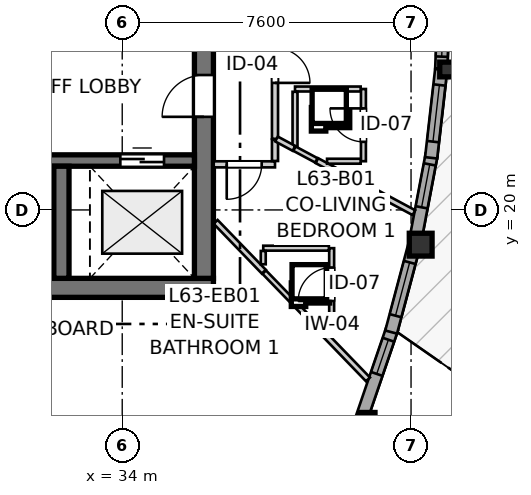
"""IFC4 building model, lengths in metres.
Left out: names, types, materials, properties, quantities, classifications, styles, units other than length and angle.
Written with IfcOpenShell. Run it as: python <this file> out.ifc"""

import sys

from ifc_helpers import new_model, si_unit, direction, frame, frame_2d, origin, origin_2d, place, context, subcontext, project, spatial, rectangle, i_section, extrude, source, transform, mapped, element, fill, save


model = new_model("IFC4")
c1 = context("Model", 3, precision=1e-05, world=origin(), true_north=direction((0.0, 1.0)))
c2 = subcontext(c1, "Body", "Model", "MODEL_VIEW")
j1 = project(units=[si_unit("LENGTHUNIT", "METRE"), si_unit("PLANEANGLEUNIT", "RADIAN")], contexts=[c1])
p1 = place(None, origin())
s1 = spatial("IfcSite", under=j1, at=p1, CompositionType="ELEMENT")
p2 = place(p1, origin())
s2 = spatial("IfcBuilding", under=s1, at=p2, CompositionType="ELEMENT")
p3 = place(p2, frame((0.0, 0.0, 211.6)))
s3 = spatial("IfcBuildingStorey", under=s2, at=p3, CompositionType="ELEMENT", Elevation=211.6)
p4 = place(p3, frame((24.3, 17.95, 0.0), z_axis=(0.0, 0.0, 1.0), x_axis=(1.0, 0.0, 0.0)))
e1 = element("IfcWall", 1, at=p4, inside=s3, PredefinedType="SHEAR", context=c2, shape_type="SweptSolid", body=[
    extrude(rectangle(XDim=12.1, YDim=0.5, at=frame_2d((6.05, 0.0))), origin(), (0.0, 0.0, 1.0), 2.96),
])
p5 = place(p3, frame((36.15, 18.2, 0.0), z_axis=(0.0, 0.0, 1.0), x_axis=(0.0, 1.0, 0.0)))
e2 = element("IfcWall", 2, at=p5, inside=s3, PredefinedType="SHEAR", context=c2, shape_type="SweptSolid", body=[
    extrude(rectangle(XDim=15.6, YDim=0.5, at=frame_2d((7.8, 0.0))), origin(), (0.0, 0.0, 1.0), 2.96),
])
p6 = place(p5, frame((4.25, 0.0, 0.0)))
e3 = element("IfcOpeningElement", 3, at=p6, cuts=e2, PredefinedType="OPENING", context=c2, shape_type="SweptSolid", body=[
    extrude(rectangle(XDim=1.1, YDim=2.15, at=frame_2d((0.55, 1.075))), frame((0.0, 0.26, 0.0), z_axis=(0.0, -1.0, 0.0), x_axis=(1.0, 0.0, 0.0)), (0.0, 0.0, 1.0), 0.52),
])
p7 = place(p5, frame((10.25, 0.0, 0.0)))
e4 = element("IfcOpeningElement", 4, at=p7, cuts=e2, PredefinedType="OPENING", context=c2, shape_type="SweptSolid", body=[
    extrude(rectangle(XDim=1.1, YDim=2.15, at=frame_2d((0.55, 1.075))), frame((0.0, 0.26, 0.0), z_axis=(0.0, -1.0, 0.0), x_axis=(1.0, 0.0, 0.0)), (0.0, 0.0, 1.0), 0.52),
])
p8 = place(p3, frame((24.8, 21.3, 0.0), z_axis=(0.0, 0.0, 1.0), x_axis=(1.0, 0.0, 0.0)))
e5 = element("IfcWall", 5, at=p8, inside=s3, PredefinedType="SHEAR", context=c2, shape_type="SweptSolid", body=[
    extrude(rectangle(XDim=11.1, YDim=0.3, at=frame_2d((5.55, 0.0))), origin(), (0.0, 0.0, 1.0), 2.96),
])
p9 = place(p8, frame((6.22, 0.0, 0.0)))
e6 = element("IfcOpeningElement", 6, at=p9, cuts=e5, PredefinedType="OPENING", context=c2, shape_type="SweptSolid", body=[
    extrude(rectangle(XDim=0.98, YDim=2.15, at=frame_2d((0.49, 1.075))), frame((0.0, 0.16, 0.0), z_axis=(0.0, -1.0, 0.0), x_axis=(1.0, 0.0, 0.0)), (0.0, 0.0, 1.0), 0.32),
])
p10 = place(p8, frame((9.15, 0.0, 0.0)))
e7 = element("IfcOpeningElement", 7, at=p10, cuts=e5, PredefinedType="OPENING", context=c2, shape_type="SweptSolid", body=[
    extrude(rectangle(XDim=1.15, YDim=2.15, at=frame_2d((0.575, 1.075))), frame((0.0, 0.16, 0.0), z_axis=(0.0, -1.0, 0.0), x_axis=(1.0, 0.0, 0.0)), (0.0, 0.0, 1.0), 0.32),
])
p11 = place(p3, frame((32.4, 18.2, 0.0), z_axis=(0.0, 0.0, 1.0), x_axis=(0.0, 1.0, 0.0)))
e8 = element("IfcWall", 8, at=p11, inside=s3, PredefinedType="SHEAR", context=c2, shape_type="SweptSolid", body=[
    extrude(rectangle(XDim=2.95, YDim=0.4, at=frame_2d((1.475, 0.0))), origin(), (0.0, 0.0, 1.0), 2.96),
])
m1 = source(origin(), c2, "Body", "SweptSolid", [
    extrude(i_section(OverallWidth=0.398, OverallDepth=0.387, WebThickness=0.019, FlangeThickness=0.03, FilletRadius=0.015, at=origin_2d()), origin(), (0.0, 0.0, 1.0), 2.96),
])
p12 = place(p3, frame((40.452, 14.478, 0.0), z_axis=(0.0, 0.0, 1.0), x_axis=(1.0, 0.0, 0.0)))
e9 = element("IfcColumn", 9, at=p12, inside=s3, PredefinedType="PILASTER", context=c2, shape_type="MappedRepresentation", body=[
    mapped(m1, transform((0.0, 0.0, 0.0), x_axis=(1.0, 0.0, 0.0), y_axis=(0.0, 1.0, 0.0), z_axis=(0.0, 0.0, 1.0), scale=1.0)),
])
m2 = source(origin(), c2, "Body", "SweptSolid", [
    extrude(rectangle(XDim=0.6, YDim=0.6, at=origin_2d()), origin(), (0.0, 0.0, 1.0), 2.96),
])
p13 = place(p3, frame((41.854, 19.086, 0.0), z_axis=(0.0, 0.0, 1.0), x_axis=(1.0, 0.0, 0.0)))
e10 = element("IfcColumn", 10, at=p13, inside=s3, PredefinedType="COLUMN", context=c2, shape_type="MappedRepresentation", body=[
    mapped(m2, transform((0.0, 0.0, 0.0), x_axis=(1.0, 0.0, 0.0), y_axis=(0.0, 1.0, 0.0), z_axis=(0.0, 0.0, 1.0), scale=1.0)),
])
p14 = place(p3, frame((42.554, 23.696, 0.0), z_axis=(0.0, 0.0, 1.0), x_axis=(1.0, 0.0, 0.0)))
e11 = element("IfcColumn", 11, at=p14, inside=s3, PredefinedType="PILASTER", context=c2, shape_type="MappedRepresentation", body=[
    mapped(m1, transform((0.0, 0.0, 0.0), x_axis=(1.0, 0.0, 0.0), y_axis=(0.0, 1.0, 0.0), z_axis=(0.0, 0.0, 1.0), scale=1.0)),
])
p15 = place(p3, frame((40.308, 14.548, 0.0), z_axis=(0.0, 0.0, 1.0), x_axis=(0.323591564922, 0.946196860654, 0.0)))
e12 = element("IfcWall", 12, at=p15, inside=s3, PredefinedType="SOLIDWALL", context=c2, shape_type="SweptSolid", body=[
    extrude(rectangle(XDim=2.454, YDim=0.32, at=frame_2d((1.227, 0.0))), origin(), (0.0, 0.0, 1.0), 2.58),
])
p16 = place(p15, frame((1.202, 0.0, 0.82)))
e13 = element("IfcOpeningElement", 13, at=p16, cuts=e12, PredefinedType="OPENING", context=c2, shape_type="SweptSolid", body=[
    extrude(rectangle(XDim=0.95, YDim=1.35, at=frame_2d((0.475, 0.675))), frame((0.0, 0.17, 0.0), z_axis=(0.0, -1.0, 0.0), x_axis=(1.0, 0.0, 0.0)), (0.0, 0.0, 1.0), 0.34),
])
p17 = place(p3, frame((41.076, 16.786, 0.0), z_axis=(0.0, 0.0, 1.0), x_axis=(0.257037260973, 0.966401493413, 0.0)))
e14 = element("IfcWall", 14, at=p17, inside=s3, PredefinedType="SOLIDWALL", context=c2, shape_type="SweptSolid", body=[
    extrude(rectangle(XDim=2.333, YDim=0.32, at=frame_2d((1.167, 0.0))), origin(), (0.0, 0.0, 1.0), 2.58),
])
p18 = place(p17, frame((0.446, 0.0, 0.82)))
e15 = element("IfcOpeningElement", 15, at=p18, cuts=e14, PredefinedType="OPENING", context=c2, shape_type="SweptSolid", body=[
    extrude(rectangle(XDim=1.45, YDim=1.25, at=frame_2d((0.725, 0.625))), frame((0.0, 0.17, 0.0), z_axis=(0.0, -1.0, 0.0), x_axis=(1.0, 0.0, 0.0)), (0.0, 0.0, 1.0), 0.34),
])
p19 = place(p3, frame((41.713, 19.205, 0.0), z_axis=(0.0, 0.0, 1.0), x_axis=(0.186691464441, 0.982418595663, 0.0)))
e16 = element("IfcWall", 16, at=p19, inside=s3, PredefinedType="SOLIDWALL", context=c2, shape_type="SweptSolid", body=[
    extrude(rectangle(XDim=2.294, YDim=0.32, at=frame_2d((1.147, 0.0))), origin(), (0.0, 0.0, 1.0), 2.58),
])
p20 = place(p19, frame((0.88, 0.0, 0.82)))
e17 = element("IfcOpeningElement", 17, at=p20, cuts=e16, PredefinedType="OPENING", context=c2, shape_type="SweptSolid", body=[
    extrude(rectangle(XDim=1.15, YDim=1.2, at=frame_2d((0.575, 0.6))), frame((0.0, 0.17, 0.0), z_axis=(0.0, -1.0, 0.0), x_axis=(1.0, 0.0, 0.0)), (0.0, 0.0, 1.0), 0.34),
])
p21 = place(p3, frame((42.128, 21.371, 0.0), z_axis=(0.0, 0.0, 1.0), x_axis=(0.113319777802, 0.993558567956, 0.0)))
e18 = element("IfcWall", 18, at=p21, inside=s3, PredefinedType="SOLIDWALL", context=c2, shape_type="SweptSolid", body=[
    extrude(rectangle(XDim=2.338, YDim=0.32, at=frame_2d((1.169, 0.0))), origin(), (0.0, 0.0, 1.0), 2.58),
])
p22 = place(p21, frame((0.429, 0.0, 0.82)))
e19 = element("IfcOpeningElement", 19, at=p22, cuts=e18, PredefinedType="OPENING", context=c2, shape_type="SweptSolid", body=[
    extrude(rectangle(XDim=1.5, YDim=1.45, at=frame_2d((0.75, 0.725))), frame((0.0, 0.17, 0.0), z_axis=(0.0, -1.0, 0.0), x_axis=(1.0, 0.0, 0.0)), (0.0, 0.0, 1.0), 0.34),
])
p23 = place(p3, frame((42.395, 23.722, 0.0), z_axis=(0.0, 0.0, 1.0), x_axis=(0.038025668885, 0.999276762717, 0.0)))
e20 = element("IfcWall", 20, at=p23, inside=s3, PredefinedType="SOLIDWALL", context=c2, shape_type="SweptSolid", body=[
    extrude(rectangle(XDim=2.324, YDim=0.32, at=frame_2d((1.162, 0.0))), origin(), (0.0, 0.0, 1.0), 2.58),
])
p24 = place(p23, frame((0.312, 0.0, 0.82)))
e21 = element("IfcOpeningElement", 21, at=p24, cuts=e20, PredefinedType="OPENING", context=c2, shape_type="SweptSolid", body=[
    extrude(rectangle(XDim=1.35, YDim=1.45, at=frame_2d((0.675, 0.725))), frame((0.0, 0.17, 0.0), z_axis=(0.0, -1.0, 0.0), x_axis=(1.0, 0.0, 0.0)), (0.0, 0.0, 1.0), 0.34),
])
p25 = place(p3, frame((38.02, 25.733, 0.0), z_axis=(0.0, 0.0, 1.0), x_axis=(0.0, -1.0, 0.0)))
e22 = element("IfcWall", 22, at=p25, inside=s3, PredefinedType="PARTITIONING", context=c2, shape_type="SweptSolid", body=[
    extrude(rectangle(XDim=3.862, YDim=0.16, at=frame_2d((1.931, 0.0))), origin(), (0.0, 0.0, 1.0), 2.96),
])
p26 = place(p25, frame((1.47, 0.0, 0.0)))
e23 = element("IfcOpeningElement", 23, at=p26, cuts=e22, PredefinedType="OPENING", context=c2, shape_type="SweptSolid", body=[
    extrude(rectangle(XDim=0.92, YDim=2.1, at=frame_2d((0.46, 1.05))), frame((0.0, 0.09, 0.0), z_axis=(0.0, -1.0, 0.0), x_axis=(1.0, 0.0, 0.0)), (0.0, 0.0, 1.0), 0.18),
])
p27 = place(p3, frame((39.511, 17.094, 0.0), z_axis=(0.0, 0.0, 1.0), x_axis=(0.0, 1.0, 0.0)))
e24 = element("IfcWall", 24, at=p27, inside=s3, PredefinedType="PARTITIONING", context=c2, shape_type="SweptSolid", body=[
    extrude(rectangle(XDim=1.9, YDim=0.13, at=frame_2d((0.95, 0.0))), origin(), (0.0, 0.0, 1.0), 2.96),
])
p28 = place(p27, frame((0.51, 0.0, 0.0)))
e25 = element("IfcOpeningElement", 25, at=p28, cuts=e24, PredefinedType="OPENING", context=c2, shape_type="SweptSolid", body=[
    extrude(rectangle(XDim=0.88, YDim=2.05, at=frame_2d((0.44, 1.025))), frame((0.0, 0.075, 0.0), z_axis=(0.0, -1.0, 0.0), x_axis=(1.0, 0.0, 0.0)), (0.0, 0.0, 1.0), 0.15),
])
p29 = place(p3, frame((40.347, 21.282, 0.0), z_axis=(0.0, 0.0, 1.0), x_axis=(0.0, 1.0, 0.0)))
e26 = element("IfcWall", 26, at=p29, inside=s3, PredefinedType="PARTITIONING", context=c2, shape_type="SweptSolid", body=[
    extrude(rectangle(XDim=1.9, YDim=0.13, at=frame_2d((0.95, 0.0))), origin(), (0.0, 0.0, 1.0), 2.598),
])
p30 = place(p29, frame((0.51, 0.0, 0.0)))
e27 = element("IfcOpeningElement", 27, at=p30, cuts=e26, PredefinedType="OPENING", context=c2, shape_type="SweptSolid", body=[
    extrude(rectangle(XDim=0.88, YDim=2.05, at=frame_2d((0.44, 1.025))), frame((0.0, 0.075, 0.0), z_axis=(0.0, -1.0, 0.0), x_axis=(1.0, 0.0, 0.0)), (0.0, 0.0, 1.0), 0.15),
])
p31 = place(p3, frame((38.02, 21.2, 0.0), z_axis=(0.0, 0.0, 1.0), x_axis=(-1.0, 0.0, 0.0)))
e28 = element("IfcWall", 28, at=p31, inside=s3, PredefinedType="PARTITIONING", context=c2, shape_type="SweptSolid", body=[
    extrude(rectangle(XDim=1.612, YDim=0.16, at=frame_2d((0.806, 0.0))), origin(), (0.0, 0.0, 1.0), 2.96),
])
p32 = place(p31, frame((0.35, 0.0, 0.0)))
e29 = element("IfcOpeningElement", 29, at=p32, cuts=e28, PredefinedType="OPENING", context=c2, shape_type="SweptSolid", body=[
    extrude(rectangle(XDim=0.92, YDim=2.1, at=frame_2d((0.46, 1.05))), frame((0.0, 0.09, 0.0), z_axis=(0.0, -1.0, 0.0), x_axis=(1.0, 0.0, 0.0)), (0.0, 0.0, 1.0), 0.18),
])
p33 = place(p3, frame((39.122, 21.297, 0.0), z_axis=(0.0, 0.0, 1.0), x_axis=(0.881308328415, -0.472541670402, 0.0)))
e30 = element("IfcWall", 30, at=p33, inside=s3, PredefinedType="PARTITIONING", context=c2, shape_type="SweptSolid", body=[
    extrude(rectangle(XDim=2.898, YDim=0.145, at=frame_2d((1.449, 0.0))), origin(), (0.0, 0.0, 1.0), 2.96),
])
p34 = place(p3, frame((38.951, 17.109, 0.0), z_axis=(0.0, 0.0, 1.0), x_axis=(0.695195716836, -0.718820502833, 0.0)))
e31 = element("IfcWall", 31, at=p34, inside=s3, PredefinedType="PARTITIONING", context=c2, shape_type="SweptSolid", body=[
    extrude(rectangle(XDim=2.18, YDim=0.145, at=frame_2d((1.09, 0.0))), origin(), (0.0, 0.0, 1.0), 2.96),
])
p35 = place(p3, frame((36.458, 19.686, 0.0), z_axis=(0.0, 0.0, 1.0), x_axis=(0.695231916786, -0.718785490868, 0.0)))
e32 = element("IfcWall", 32, at=p35, inside=s3, PredefinedType="PARTITIONING", context=c2, shape_type="SweptSolid", body=[
    extrude(rectangle(XDim=1.824, YDim=0.145, at=frame_2d((0.912, 0.0))), origin(), (0.0, 0.0, 1.0), 2.96),
])
p36 = place(p3, frame((37.711, 18.994, 0.0), z_axis=(0.0, 0.0, 1.0), x_axis=(1.0, 0.0, 0.0)))
e33 = element("IfcWall", 33, at=p36, inside=s3, PredefinedType="PARTITIONING", context=c2, shape_type="SweptSolid", body=[
    extrude(rectangle(XDim=1.727, YDim=0.13, at=frame_2d((0.864, 0.0))), origin(), (0.0, 0.0, 1.0), 2.96),
])
p37 = place(p3, frame((38.547, 23.182, 0.0), z_axis=(0.0, 0.0, 1.0), x_axis=(1.0, 0.0, 0.0)))
e34 = element("IfcWall", 34, at=p37, inside=s3, PredefinedType="PARTITIONING", context=c2, shape_type="SweptSolid", body=[
    extrude(rectangle(XDim=1.727, YDim=0.13, at=frame_2d((0.863, 0.0))), origin(), (0.0, 0.0, 1.0), 2.96),
])
p38 = place(p3, frame((37.736, 18.364, 0.0), z_axis=(0.0, 0.0, 1.0), x_axis=(0.695451956037, -0.718572596781, 0.0)))
e35 = element("IfcWall", 35, at=p38, inside=s3, PredefinedType="PARTITIONING", context=c2, shape_type="SweptSolid", body=[
    extrude(rectangle(XDim=1.732, YDim=0.13, at=frame_2d((0.866, 0.0))), origin(), (0.0, 0.0, 1.0), 2.96),
])
p39 = place(p3, frame((38.547, 21.605, 0.0), z_axis=(0.0, 0.0, 1.0), x_axis=(0.0, 1.0, 0.0)))
e36 = element("IfcWall", 36, at=p39, inside=s3, PredefinedType="PARTITIONING", context=c2, shape_type="SweptSolid", body=[
    extrude(rectangle(XDim=1.504, YDim=0.13, at=frame_2d((0.752, 0.0))), origin(), (0.0, 0.0, 1.0), 2.628),
])
p40 = place(p3, frame((39.39, 21.282, 0.0), z_axis=(0.0, 0.0, 1.0), x_axis=(1.0, 0.0, 0.0)))
e37 = element("IfcWall", 37, at=p40, inside=s3, PredefinedType="PARTITIONING", context=c2, shape_type="SweptSolid", body=[
    extrude(rectangle(XDim=0.884, YDim=0.13, at=frame_2d((0.442, 0.0))), origin(), (0.0, 0.0, 1.0), 2.96),
])
p41 = place(p3, frame((38.02, 21.288, 0.0), z_axis=(0.0, 0.0, 1.0), x_axis=(0.0, 1.0, 0.0)))
e38 = element("IfcWall", 38, at=p41, inside=s3, PredefinedType="PARTITIONING", context=c2, shape_type="SweptSolid", body=[
    extrude(rectangle(XDim=0.568, YDim=0.16, at=frame_2d((0.284, 0.0))), origin(), (0.0, 0.0, 1.0), 2.96),
])
p42 = place(p3, frame((38.532, 21.613, 0.0), z_axis=(0.0, 0.0, 1.0), x_axis=(0.881618593919, -0.471962556626, 0.0)))
e39 = element("IfcWall", 39, at=p42, inside=s3, PredefinedType="PARTITIONING", context=c2, shape_type="SweptSolid", body=[
    extrude(rectangle(XDim=0.654, YDim=0.13, at=frame_2d((0.327, 0.0))), origin(), (0.0, 0.0, 1.0), 2.96),
])
p43 = place(p3, frame((37.711, 18.571, 0.0), z_axis=(0.0, 0.0, 1.0), x_axis=(0.0, 1.0, 0.0)))
e40 = element("IfcWall", 40, at=p43, inside=s3, PredefinedType="PARTITIONING", context=c2, shape_type="SweptSolid", body=[
    extrude(rectangle(XDim=0.35, YDim=0.13, at=frame_2d((0.175, 0.0))), origin(), (0.0, 0.0, 1.0), 2.96),
])
p44 = place(p3, frame((38.06, 21.867, 0.0), z_axis=(0.0, 0.0, 1.0), x_axis=(0.881026965879, -0.473066047601, 0.0)))
e41 = element("IfcWall", 41, at=p44, inside=s3, PredefinedType="PARTITIONING", context=c2, shape_type="SweptSolid", body=[
    extrude(rectangle(XDim=0.521, YDim=0.145, at=frame_2d((0.261, 0.0))), origin(), (0.0, 0.0, 1.0), 2.96),
])
p45 = place(p3, frame((39.056, 17.094, 0.0), z_axis=(0.0, 0.0, 1.0), x_axis=(1.0, 0.0, 0.0)))
e42 = element("IfcWall", 42, at=p45, inside=s3, PredefinedType="PARTITIONING", context=c2, shape_type="SweptSolid", body=[
    extrude(rectangle(XDim=0.455, YDim=0.13, at=frame_2d((0.228, 0.0))), origin(), (0.0, 0.0, 1.0), 2.96),
])
m3 = source(origin(), c2, "Body", "SweptSolid", [
    extrude(rectangle(XDim=0.95, YDim=1.35, at=frame_2d((0.475, 0.675))), frame((0.0, 0.03, 0.0), z_axis=(0.0, -1.0, 0.0), x_axis=(1.0, 0.0, 0.0)), (0.0, 0.0, 1.0), 0.06),
])
p46 = place(p16, origin())
e43 = element("IfcWindow", 43, at=p46, inside=s3, PartitioningType="SINGLE_PANEL", PredefinedType="WINDOW", context=c2, shape_type="MappedRepresentation", body=[
    mapped(m3, transform((0.0, 0.0, 0.0), x_axis=(1.0, 0.0, 0.0), y_axis=(0.0, 1.0, 0.0), z_axis=(0.0, 0.0, 1.0), scale=1.0)),
])
fill(e13, e43)
m4 = source(origin(), c2, "Body", "SweptSolid", [
    extrude(rectangle(XDim=1.45, YDim=1.25, at=frame_2d((0.725, 0.625))), frame((0.0, 0.03, 0.0), z_axis=(0.0, -1.0, 0.0), x_axis=(1.0, 0.0, 0.0)), (0.0, 0.0, 1.0), 0.06),
])
p47 = place(p18, origin())
e44 = element("IfcWindow", 44, at=p47, inside=s3, PartitioningType="SINGLE_PANEL", PredefinedType="WINDOW", context=c2, shape_type="MappedRepresentation", body=[
    mapped(m4, transform((0.0, 0.0, 0.0), x_axis=(1.0, 0.0, 0.0), y_axis=(0.0, 1.0, 0.0), z_axis=(0.0, 0.0, 1.0), scale=1.0)),
])
fill(e15, e44)
m5 = source(origin(), c2, "Body", "SweptSolid", [
    extrude(rectangle(XDim=1.15, YDim=1.2, at=frame_2d((0.575, 0.6))), frame((0.0, 0.03, 0.0), z_axis=(0.0, -1.0, 0.0), x_axis=(1.0, 0.0, 0.0)), (0.0, 0.0, 1.0), 0.06),
])
p48 = place(p20, origin())
e45 = element("IfcWindow", 45, at=p48, inside=s3, PartitioningType="SINGLE_PANEL", PredefinedType="WINDOW", context=c2, shape_type="MappedRepresentation", body=[
    mapped(m5, transform((0.0, 0.0, 0.0), x_axis=(1.0, 0.0, 0.0), y_axis=(0.0, 1.0, 0.0), z_axis=(0.0, 0.0, 1.0), scale=1.0)),
])
fill(e17, e45)
m6 = source(origin(), c2, "Body", "SweptSolid", [
    extrude(rectangle(XDim=1.5, YDim=1.45, at=frame_2d((0.75, 0.725))), frame((0.0, 0.03, 0.0), z_axis=(0.0, -1.0, 0.0), x_axis=(1.0, 0.0, 0.0)), (0.0, 0.0, 1.0), 0.06),
])
p49 = place(p22, origin())
e46 = element("IfcWindow", 46, at=p49, inside=s3, PartitioningType="SINGLE_PANEL", PredefinedType="WINDOW", context=c2, shape_type="MappedRepresentation", body=[
    mapped(m6, transform((0.0, 0.0, 0.0), x_axis=(1.0, 0.0, 0.0), y_axis=(0.0, 1.0, 0.0), z_axis=(0.0, 0.0, 1.0), scale=1.0)),
])
fill(e19, e46)
m7 = source(origin(), c2, "Body", "SweptSolid", [
    extrude(rectangle(XDim=1.35, YDim=1.45, at=frame_2d((0.675, 0.725))), frame((0.0, 0.03, 0.0), z_axis=(0.0, -1.0, 0.0), x_axis=(1.0, 0.0, 0.0)), (0.0, 0.0, 1.0), 0.06),
])
p50 = place(p24, origin())
e47 = element("IfcWindow", 47, at=p50, inside=s3, PartitioningType="SINGLE_PANEL", PredefinedType="WINDOW", context=c2, shape_type="MappedRepresentation", body=[
    mapped(m7, transform((0.0, 0.0, 0.0), x_axis=(1.0, 0.0, 0.0), y_axis=(0.0, 1.0, 0.0), z_axis=(0.0, 0.0, 1.0), scale=1.0)),
])
fill(e21, e47)
m8 = source(origin(), c2, "Body", "SweptSolid", [
    extrude(rectangle(XDim=1.15, YDim=2.15, at=frame_2d((0.575, 1.075))), frame((0.0, 0.025, 0.0), z_axis=(0.0, -1.0, 0.0), x_axis=(1.0, 0.0, 0.0)), (0.0, 0.0, 1.0), 0.05),
])
p51 = place(p10, origin())
e48 = element("IfcDoor", 48, at=p51, inside=s3, OperationType="DOUBLE_DOOR_SLIDING", PredefinedType="DOOR", context=c2, shape_type="MappedRepresentation", body=[
    mapped(m8, transform((0.0, 0.0, 0.0), x_axis=(1.0, 0.0, 0.0), y_axis=(0.0, 1.0, 0.0), z_axis=(0.0, 0.0, 1.0), scale=1.0)),
])
fill(e7, e48)
m9 = source(origin(), c2, "Body", "SweptSolid", [
    extrude(rectangle(XDim=1.1, YDim=2.15, at=frame_2d((0.55, 1.075))), frame((0.0, 0.025, 0.0), z_axis=(0.0, -1.0, 0.0), x_axis=(1.0, 0.0, 0.0)), (0.0, 0.0, 1.0), 0.05),
])
p52 = place(p6, origin())
e49 = element("IfcDoor", 49, at=p52, inside=s3, OperationType="SINGLE_SWING_LEFT", PredefinedType="DOOR", context=c2, shape_type="MappedRepresentation", body=[
    mapped(m9, transform((0.0, 0.0, 0.0), x_axis=(1.0, 0.0, 0.0), y_axis=(0.0, 1.0, 0.0), z_axis=(0.0, 0.0, 1.0), scale=1.0)),
])
fill(e3, e49)
m10 = source(origin(), c2, "Body", "SweptSolid", [
    extrude(rectangle(XDim=0.92, YDim=2.1, at=frame_2d((0.46, 1.05))), frame((0.0, 0.025, 0.0), z_axis=(0.0, -1.0, 0.0), x_axis=(1.0, 0.0, 0.0)), (0.0, 0.0, 1.0), 0.05),
])
p53 = place(p26, origin())
e50 = element("IfcDoor", 50, at=p53, inside=s3, OperationType="SINGLE_SWING_RIGHT", PredefinedType="DOOR", context=c2, shape_type="MappedRepresentation", body=[
    mapped(m10, transform((0.0, 0.0, 0.0), x_axis=(1.0, 0.0, 0.0), y_axis=(0.0, 1.0, 0.0), z_axis=(0.0, 0.0, 1.0), scale=1.0)),
])
fill(e23, e50)
m11 = source(origin(), c2, "Body", "SweptSolid", [
    extrude(rectangle(XDim=0.88, YDim=2.05, at=frame_2d((0.44, 1.025))), frame((0.0, 0.025, 0.0), z_axis=(0.0, -1.0, 0.0), x_axis=(1.0, 0.0, 0.0)), (0.0, 0.0, 1.0), 0.05),
])
p54 = place(p28, origin())
e51 = element("IfcDoor", 51, at=p54, inside=s3, OperationType="SINGLE_SWING_LEFT", PredefinedType="DOOR", context=c2, shape_type="MappedRepresentation", body=[
    mapped(m11, transform((0.0, 0.0, 0.0), x_axis=(1.0, 0.0, 0.0), y_axis=(0.0, 1.0, 0.0), z_axis=(0.0, 0.0, 1.0), scale=1.0)),
])
fill(e25, e51)
p55 = place(p30, origin())
e52 = element("IfcDoor", 52, at=p55, inside=s3, OperationType="SINGLE_SWING_RIGHT", PredefinedType="DOOR", context=c2, shape_type="MappedRepresentation", body=[
    mapped(m11, transform((0.0, 0.0, 0.0), x_axis=(1.0, 0.0, 0.0), y_axis=(0.0, 1.0, 0.0), z_axis=(0.0, 0.0, 1.0), scale=1.0)),
])
fill(e27, e52)
p56 = place(p32, origin())
e53 = element("IfcDoor", 53, at=p56, inside=s3, OperationType="SINGLE_SWING_RIGHT", PredefinedType="DOOR", context=c2, shape_type="MappedRepresentation", body=[
    mapped(m10, transform((0.0, 0.0, 0.0), x_axis=(1.0, 0.0, 0.0), y_axis=(0.0, 1.0, 0.0), z_axis=(0.0, 0.0, 1.0), scale=1.0)),
])
fill(e29, e53)
save(model, sys.argv[1])
